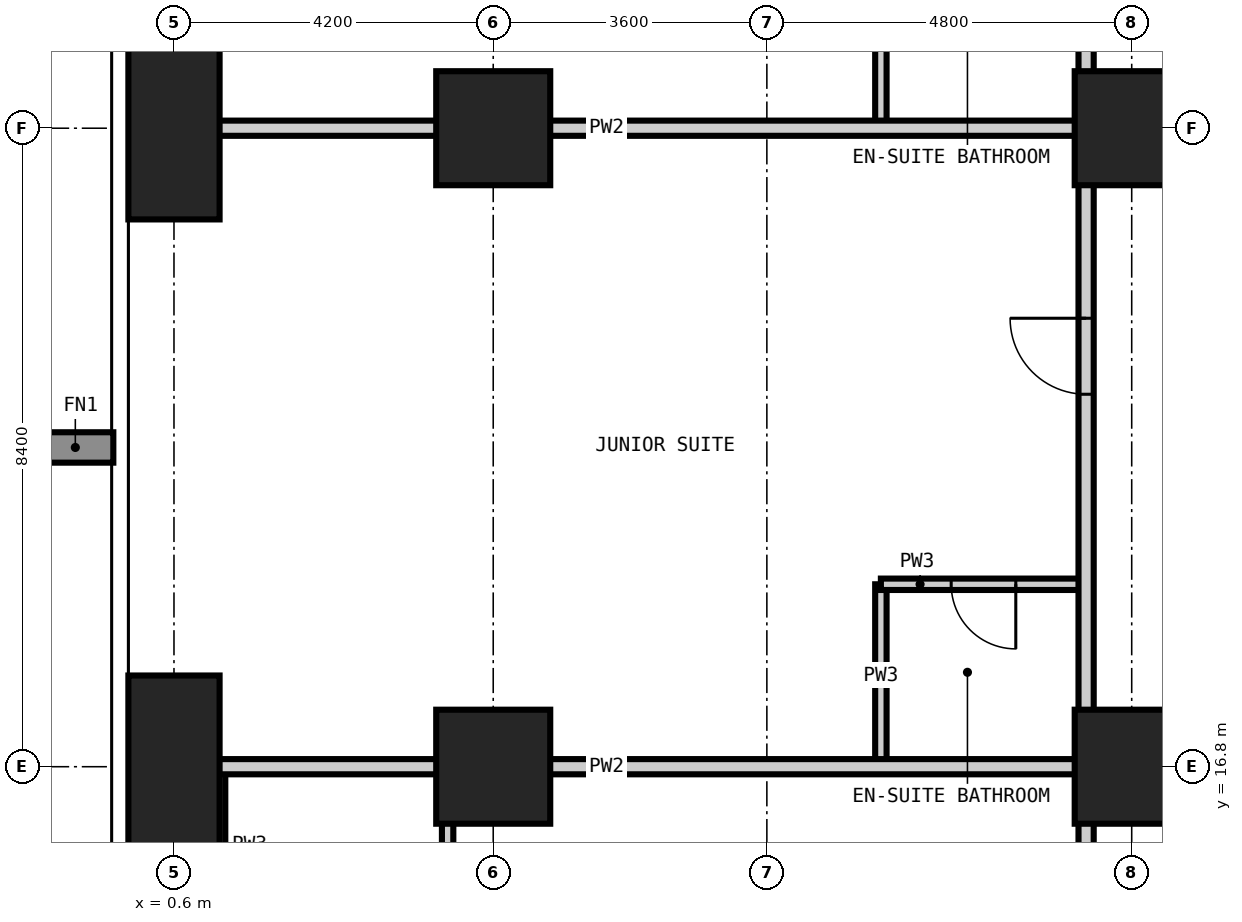
"""IFC4 building model, lengths in metres.
Left out: names, types, materials, properties, quantities, classifications, styles, units other than length and angle.
Written with IfcOpenShell. Run it as: python <this file> out.ifc"""

import sys

from ifc_helpers import new_model, si_unit, direction, frame, frame_2d, origin, origin_2d, place, context, subcontext, project, spatial, rectangle, extrude, element, fill, save


model = new_model("IFC4")
c1 = context("Model", 3, precision=1e-05, world=origin(), true_north=direction((0.0, 1.0)))
c2 = subcontext(c1, "Body", "Model", "MODEL_VIEW")
j1 = project(units=[si_unit("LENGTHUNIT", "METRE"), si_unit("PLANEANGLEUNIT", "RADIAN")], contexts=[c1])
p1 = place(None, origin())
s1 = spatial("IfcSite", under=j1, at=p1, CompositionType="ELEMENT")
p2 = place(p1, origin())
s2 = spatial("IfcBuilding", under=s1, at=p2, CompositionType="ELEMENT")
p3 = place(p2, frame((0.0, 0.0, 111.6)))
s3 = spatial("IfcBuildingStorey", under=s2, at=p3, CompositionType="ELEMENT", Elevation=111.6)
for number, where, z_axis, x_axis in (
    (1, (0.6, 16.8, -0.35), (0.0, 0.0, 1.0), (1.0, 0.0, 0.0)),
    (2, (0.6, 25.2, -0.35), (0.0, 0.0, 1.0), (1.0, 0.0, 0.0)),
):
    element("IfcColumn", number, at=place(p3, frame(where, z_axis=z_axis, x_axis=x_axis)), inside=s3, PredefinedType="COLUMN", context=c2, shape_type="SweptSolid", body=[
        extrude(rectangle(XDim=1.2, YDim=2.4, at=origin_2d()), origin(), (0.0, 0.0, 1.0), 3.6),
    ])
for number, where, z_axis, x_axis in (
    (3, (4.8, 16.8, -0.35), (0.0, 0.0, 1.0), (1.0, 0.0, 0.0)),
    (4, (4.8, 25.2, -0.35), (0.0, 0.0, 1.0), (1.0, 0.0, 0.0)),
    (5, (13.2, 16.8, -0.35), (0.0, 0.0, 1.0), (1.0, 0.0, 0.0)),
    (6, (13.2, 25.2, -0.35), (0.0, 0.0, 1.0), (1.0, 0.0, 0.0)),
):
    element("IfcColumn", number, at=place(p3, frame(where, z_axis=z_axis, x_axis=x_axis)), inside=s3, PredefinedType="COLUMN", context=c2, shape_type="SweptSolid", body=[
        extrude(rectangle(XDim=1.5, YDim=1.5, at=origin_2d()), origin(), (0.0, 0.0, 1.0), 3.6),
    ])
p4 = place(p3, frame((1.2, 13.2, 0.0), z_axis=(0.0, 0.0, 1.0), x_axis=(0.0, 1.0, 0.0)))
e7 = element("IfcWall", 7, at=p4, inside=s3, PredefinedType="PARTITIONING", context=c2, shape_type="SweptSolid", body=[
    extrude(rectangle(XDim=3.6, YDim=0.15, at=frame_2d((1.8, 0.0))), origin(), (0.0, 0.0, 1.0), 3.25),
])
p5 = place(p4, frame((1.375, 0.0, 0.0)))
e8 = element("IfcOpeningElement", 8, at=p5, cuts=e7, PredefinedType="OPENING", context=c2, shape_type="SweptSolid", body=[
    extrude(rectangle(XDim=0.85, YDim=2.1, at=frame_2d((0.425, 1.05))), frame((0.0, 0.085, 0.0), z_axis=(0.0, -1.0, 0.0), x_axis=(1.0, 0.0, 0.0)), (0.0, 0.0, 1.0), 0.17),
])
p6 = place(p3, frame((9.9, 16.8, 0.0), z_axis=(0.0, 0.0, 1.0), x_axis=(0.0, 1.0, 0.0)))
e9 = element("IfcWall", 9, at=p6, inside=s3, PredefinedType="PARTITIONING", context=c2, shape_type="SweptSolid", body=[
    extrude(rectangle(XDim=2.4, YDim=0.15, at=frame_2d((1.2, 0.0))), origin(), (0.0, 0.0, 1.0), 3.25),
])
p7 = place(p3, frame((9.9, 25.2, 0.0), z_axis=(0.0, 0.0, 1.0), x_axis=(0.0, 1.0, 0.0)))
e10 = element("IfcWall", 10, at=p7, inside=s3, PredefinedType="PARTITIONING", context=c2, shape_type="SweptSolid", body=[
    extrude(rectangle(XDim=2.4, YDim=0.15, at=frame_2d((1.2, 0.0))), origin(), (0.0, 0.0, 1.0), 3.25),
])
p8 = place(p3, frame((9.9, 19.2, 0.0), z_axis=(0.0, 0.0, 1.0), x_axis=(1.0, 0.0, 0.0)))
e11 = element("IfcWall", 11, at=p8, inside=s3, PredefinedType="PARTITIONING", context=c2, shape_type="SweptSolid", body=[
    extrude(rectangle(XDim=2.7, YDim=0.15, at=frame_2d((1.35, 0.0))), origin(), (0.0, 0.0, 1.0), 3.25),
])
p9 = place(p8, frame((0.925, 0.0, 0.0)))
e12 = element("IfcOpeningElement", 12, at=p9, cuts=e11, PredefinedType="OPENING", context=c2, shape_type="SweptSolid", body=[
    extrude(rectangle(XDim=0.85, YDim=2.1, at=frame_2d((0.425, 1.05))), frame((0.0, 0.085, 0.0), z_axis=(0.0, -1.0, 0.0), x_axis=(1.0, 0.0, 0.0)), (0.0, 0.0, 1.0), 0.17),
])
p10 = place(p3, frame((12.6, 12.875, 0.0), z_axis=(0.0, 0.0, 1.0), x_axis=(0.0, 1.0, 0.0)))
e13 = element("IfcWall", 13, at=p10, inside=s3, PredefinedType="PARTITIONING", context=c2, shape_type="SweptSolid", body=[
    extrude(rectangle(XDim=31.85, YDim=0.2, at=frame_2d((15.925, 0.0))), origin(), (0.0, 0.0, 1.0), 3.25),
])
p11 = place(p10, frame((8.825, 0.0, 0.0)))
e14 = element("IfcOpeningElement", 14, at=p11, cuts=e13, PredefinedType="OPENING", context=c2, shape_type="SweptSolid", body=[
    extrude(rectangle(XDim=1.0, YDim=2.2, at=frame_2d((0.5, 1.1))), frame((0.0, 0.11, 0.0), z_axis=(0.0, -1.0, 0.0), x_axis=(1.0, 0.0, 0.0)), (0.0, 0.0, 1.0), 0.22),
])
p12 = place(p10, frame((17.225, 0.0, 0.0)))
e15 = element("IfcOpeningElement", 15, at=p12, cuts=e13, PredefinedType="OPENING", context=c2, shape_type="SweptSolid", body=[
    extrude(rectangle(XDim=1.0, YDim=2.2, at=frame_2d((0.5, 1.1))), frame((0.0, 0.11, 0.0), z_axis=(0.0, -1.0, 0.0), x_axis=(1.0, 0.0, 0.0)), (0.0, 0.0, 1.0), 0.22),
])
p13 = place(p10, frame((25.625, 0.0, 0.0)))
e16 = element("IfcOpeningElement", 16, at=p13, cuts=e13, PredefinedType="OPENING", context=c2, shape_type="SweptSolid", body=[
    extrude(rectangle(XDim=1.0, YDim=2.2, at=frame_2d((0.5, 1.1))), frame((0.0, 0.11, 0.0), z_axis=(0.0, -1.0, 0.0), x_axis=(1.0, 0.0, 0.0)), (0.0, 0.0, 1.0), 0.22),
])
p14 = place(p10, frame((1.463, 0.0, 0.0)))
e17 = element("IfcOpeningElement", 17, at=p14, cuts=e13, PredefinedType="OPENING", context=c2, shape_type="SweptSolid", body=[
    extrude(rectangle(XDim=1.0, YDim=2.2, at=frame_2d((0.5, 1.1))), frame((0.0, 0.11, 0.0), z_axis=(0.0, -1.0, 0.0), x_axis=(1.0, 0.0, 0.0)), (0.0, 0.0, 1.0), 0.22),
])
p15 = place(p10, frame((29.987, 0.0, 0.0)))
e18 = element("IfcOpeningElement", 18, at=p15, cuts=e13, PredefinedType="OPENING", context=c2, shape_type="SweptSolid", body=[
    extrude(rectangle(XDim=1.0, YDim=2.2, at=frame_2d((0.5, 1.1))), frame((0.0, 0.11, 0.0), z_axis=(0.0, -1.0, 0.0), x_axis=(1.0, 0.0, 0.0)), (0.0, 0.0, 1.0), 0.22),
])
for number, where, z_axis, x_axis in (
    (19, (-0.018, 16.8, 0.0), (0.0, 0.0, 1.0), (1.0, 0.0, 0.0)),
    (20, (-0.018, 25.2, 0.0), (0.0, 0.0, 1.0), (1.0, 0.0, 0.0)),
):
    element("IfcWall", number, at=place(p3, frame(where, z_axis=z_axis, x_axis=x_axis)), inside=s3, PredefinedType="PARTITIONING", context=c2, shape_type="SweptSolid", body=[
        extrude(rectangle(XDim=12.618, YDim=0.2, at=frame_2d((6.309, 0.0))), origin(), (0.0, 0.0, 1.0), 3.25),
    ])
p16 = place(p3, frame((4.2, -0.018, 0.0), z_axis=(0.0, 0.0, 1.0), x_axis=(0.0, 1.0, 0.0)))
e21 = element("IfcWall", 21, at=p16, inside=s3, PredefinedType="PARTITIONING", context=c2, shape_type="SweptSolid", body=[
    extrude(rectangle(XDim=16.818, YDim=0.15, at=frame_2d((8.409, 0.0))), origin(), (0.0, 0.0, 1.0), 3.25),
])
p17 = place(p16, frame((4.968, 0.0, 0.0)))
e22 = element("IfcOpeningElement", 22, at=p17, cuts=e21, PredefinedType="OPENING", context=c2, shape_type="SweptSolid", body=[
    extrude(rectangle(XDim=0.9, YDim=2.1, at=frame_2d((0.45, 1.05))), frame((0.0, 0.085, 0.0), z_axis=(0.0, -1.0, 0.0), x_axis=(1.0, 0.0, 0.0)), (0.0, 0.0, 1.0), 0.17),
])
p18 = place(p11, origin())
e23 = element("IfcDoor", 23, at=p18, inside=s3, OperationType="SINGLE_SWING_RIGHT", PredefinedType="DOOR", context=c2, shape_type="SweptSolid", body=[
    extrude(rectangle(XDim=1.0, YDim=2.2, at=frame_2d((0.5, 1.1))), frame((0.0, 0.025, 0.0), z_axis=(0.0, -1.0, 0.0), x_axis=(1.0, 0.0, 0.0)), (0.0, 0.0, 1.0), 0.05),
])
fill(e14, e23)
p19 = place(p9, frame((0.85, 0.0, 0.0), z_axis=(0.0, 0.0, 1.0), x_axis=(-1.0, 0.0, 0.0)))
e24 = element("IfcDoor", 24, at=p19, inside=s3, OperationType="SINGLE_SWING_LEFT", PredefinedType="DOOR", context=c2, shape_type="SweptSolid", body=[
    extrude(rectangle(XDim=0.85, YDim=2.1, at=frame_2d((0.425, 1.05))), frame((0.0, 0.025, 0.0), z_axis=(0.0, -1.0, 0.0), x_axis=(1.0, 0.0, 0.0)), (0.0, 0.0, 1.0), 0.05),
])
fill(e12, e24)
save(model, sys.argv[1])
